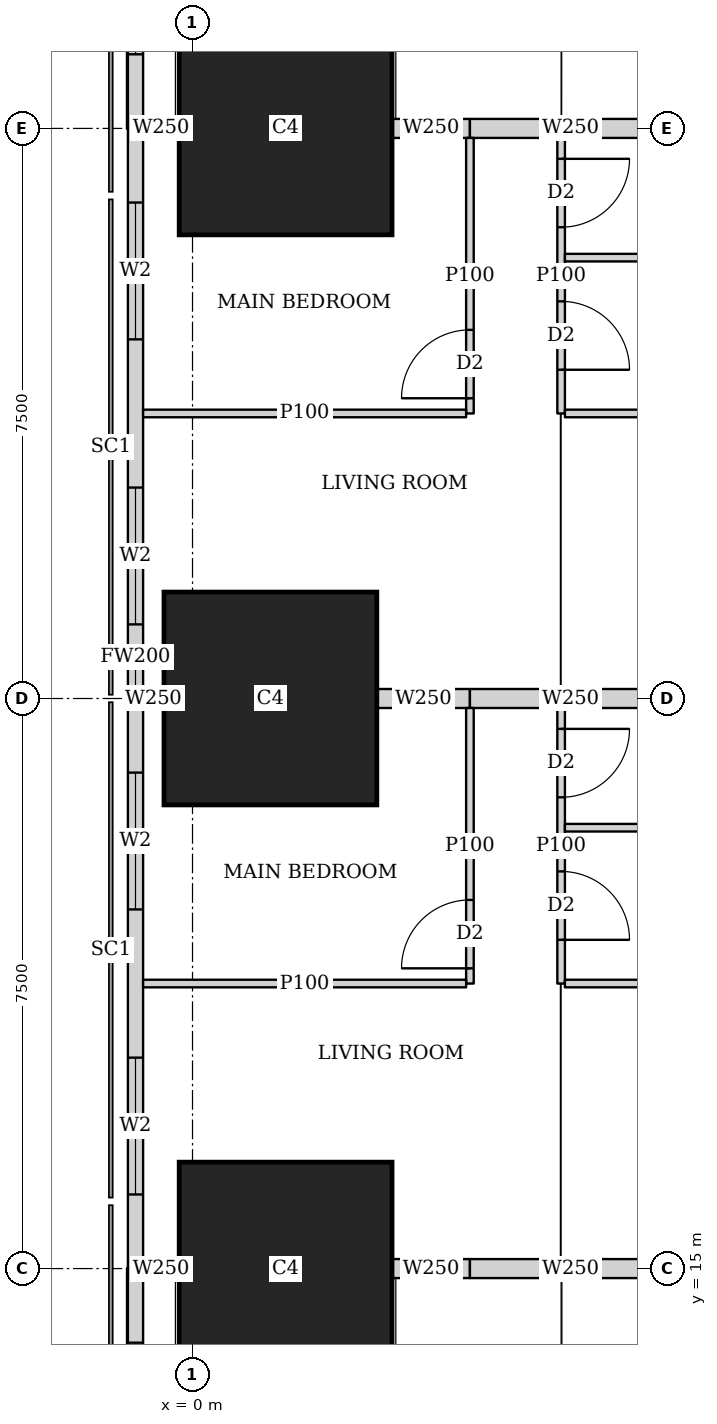
"""IFC4 building model, lengths in metres.
Left out: names, types, materials, properties, quantities, classifications, styles, units other than length and angle.
Written with IfcOpenShell. Run it as: python <this file> out.ifc"""

import sys

from ifc_helpers import new_model, si_unit, direction, frame, frame_2d, origin, origin_2d, place, context, subcontext, project, spatial, rectangle, extrude, element, fill, save


model = new_model("IFC4")
c1 = context("Model", 3, precision=1e-05, world=origin(), true_north=direction((0.0, 1.0)))
c2 = subcontext(c1, "Body", "Model", "MODEL_VIEW")
j1 = project(units=[si_unit("LENGTHUNIT", "METRE"), si_unit("PLANEANGLEUNIT", "RADIAN")], contexts=[c1])
p1 = place(None, origin())
s1 = spatial("IfcSite", under=j1, at=p1, CompositionType="ELEMENT")
p2 = place(p1, origin())
s2 = spatial("IfcBuilding", under=s1, at=p2, CompositionType="ELEMENT")
p3 = place(p2, frame((0.0, 0.0, 42.5)))
s3 = spatial("IfcBuildingStorey", under=s2, at=p3, CompositionType="ELEMENT", Elevation=42.5)
for number, where, z_axis, x_axis in (
    (1, (1.225, 15.0, 0.0), (0.0, 0.0, 1.0), (1.0, 0.0, 0.0)),
    (2, (1.025, 22.5, 0.0), (0.0, 0.0, 1.0), (1.0, 0.0, 0.0)),
    (3, (1.225, 30.0, 0.0), (0.0, 0.0, 1.0), (1.0, 0.0, 0.0)),
):
    element("IfcColumn", number, at=place(p3, frame(where, z_axis=z_axis, x_axis=x_axis)), inside=s3, PredefinedType="COLUMN", context=c2, shape_type="SweptSolid", body=[
        extrude(rectangle(XDim=2.8, YDim=2.8, at=origin_2d()), origin(), (0.0, 0.0, 1.0), 3.75),
    ])
p4 = place(p3, frame((-0.75, 42.837, 0.0), z_axis=(0.0, 0.0, 1.0), x_axis=(0.0, -1.0, 0.0)))
e4 = element("IfcWall", 4, at=p4, inside=s3, PredefinedType="SOLIDWALL", context=c2, shape_type="SweptSolid", body=[
    extrude(rectangle(XDim=40.674, YDim=0.2, at=frame_2d((20.337, 0.0))), origin(), (0.0, 0.0, 1.0), 3.5),
])
p5 = place(p4, frame((1.78, 0.0, 0.9)))
e5 = element("IfcOpeningElement", 5, at=p5, cuts=e4, PredefinedType="OPENING", context=c2, shape_type="SweptSolid", body=[
    extrude(rectangle(XDim=1.8, YDim=1.5, at=frame_2d((0.9, 0.75))), frame((0.0, 0.11, 0.0), z_axis=(0.0, -1.0, 0.0), x_axis=(1.0, 0.0, 0.0)), (0.0, 0.0, 1.0), 0.22),
])
p6 = place(p4, frame((6.312, 0.0, 0.9)))
e6 = element("IfcOpeningElement", 6, at=p6, cuts=e4, PredefinedType="OPENING", context=c2, shape_type="SweptSolid", body=[
    extrude(rectangle(XDim=1.8, YDim=1.5, at=frame_2d((0.9, 0.75))), frame((0.0, 0.11, 0.0), z_axis=(0.0, -1.0, 0.0), x_axis=(1.0, 0.0, 0.0)), (0.0, 0.0, 1.0), 0.22),
])
p7 = place(p4, frame((10.062, 0.0, 0.9)))
e7 = element("IfcOpeningElement", 7, at=p7, cuts=e4, PredefinedType="OPENING", context=c2, shape_type="SweptSolid", body=[
    extrude(rectangle(XDim=1.8, YDim=1.5, at=frame_2d((0.9, 0.75))), frame((0.0, 0.11, 0.0), z_axis=(0.0, -1.0, 0.0), x_axis=(1.0, 0.0, 0.0)), (0.0, 0.0, 1.0), 0.22),
])
p8 = place(p4, frame((13.812, 0.0, 0.9)))
e8 = element("IfcOpeningElement", 8, at=p8, cuts=e4, PredefinedType="OPENING", context=c2, shape_type="SweptSolid", body=[
    extrude(rectangle(XDim=1.8, YDim=1.5, at=frame_2d((0.9, 0.75))), frame((0.0, 0.11, 0.0), z_axis=(0.0, -1.0, 0.0), x_axis=(1.0, 0.0, 0.0)), (0.0, 0.0, 1.0), 0.22),
])
p9 = place(p4, frame((17.562, 0.0, 0.9)))
e9 = element("IfcOpeningElement", 9, at=p9, cuts=e4, PredefinedType="OPENING", context=c2, shape_type="SweptSolid", body=[
    extrude(rectangle(XDim=1.8, YDim=1.5, at=frame_2d((0.9, 0.75))), frame((0.0, 0.11, 0.0), z_axis=(0.0, -1.0, 0.0), x_axis=(1.0, 0.0, 0.0)), (0.0, 0.0, 1.0), 0.22),
])
p10 = place(p4, frame((21.312, 0.0, 0.9)))
e10 = element("IfcOpeningElement", 10, at=p10, cuts=e4, PredefinedType="OPENING", context=c2, shape_type="SweptSolid", body=[
    extrude(rectangle(XDim=1.8, YDim=1.5, at=frame_2d((0.9, 0.75))), frame((0.0, 0.11, 0.0), z_axis=(0.0, -1.0, 0.0), x_axis=(1.0, 0.0, 0.0)), (0.0, 0.0, 1.0), 0.22),
])
p11 = place(p4, frame((25.062, 0.0, 0.9)))
e11 = element("IfcOpeningElement", 11, at=p11, cuts=e4, PredefinedType="OPENING", context=c2, shape_type="SweptSolid", body=[
    extrude(rectangle(XDim=1.8, YDim=1.5, at=frame_2d((0.9, 0.75))), frame((0.0, 0.11, 0.0), z_axis=(0.0, -1.0, 0.0), x_axis=(1.0, 0.0, 0.0)), (0.0, 0.0, 1.0), 0.22),
])
p12 = place(p4, frame((28.812, 0.0, 0.9)))
e12 = element("IfcOpeningElement", 12, at=p12, cuts=e4, PredefinedType="OPENING", context=c2, shape_type="SweptSolid", body=[
    extrude(rectangle(XDim=1.8, YDim=1.5, at=frame_2d((0.9, 0.75))), frame((0.0, 0.11, 0.0), z_axis=(0.0, -1.0, 0.0), x_axis=(1.0, 0.0, 0.0)), (0.0, 0.0, 1.0), 0.22),
])
p13 = place(p4, frame((32.562, 0.0, 0.9)))
e13 = element("IfcOpeningElement", 13, at=p13, cuts=e4, PredefinedType="OPENING", context=c2, shape_type="SweptSolid", body=[
    extrude(rectangle(XDim=1.8, YDim=1.5, at=frame_2d((0.9, 0.75))), frame((0.0, 0.11, 0.0), z_axis=(0.0, -1.0, 0.0), x_axis=(1.0, 0.0, 0.0)), (0.0, 0.0, 1.0), 0.22),
])
p14 = place(p4, frame((37.094, 0.0, 0.9)))
e14 = element("IfcOpeningElement", 14, at=p14, cuts=e4, PredefinedType="OPENING", context=c2, shape_type="SweptSolid", body=[
    extrude(rectangle(XDim=1.8, YDim=1.5, at=frame_2d((0.9, 0.75))), frame((0.0, 0.11, 0.0), z_axis=(0.0, -1.0, 0.0), x_axis=(1.0, 0.0, 0.0)), (0.0, 0.0, 1.0), 0.22),
])
p15 = place(p3, frame((3.65, 18.75, 0.0), z_axis=(0.0, 0.0, 1.0), x_axis=(0.0, 1.0, 0.0)))
e15 = element("IfcWall", 15, at=p15, inside=s3, PredefinedType="PARTITIONING", context=c2, shape_type="SweptSolid", body=[
    extrude(rectangle(XDim=3.625, YDim=0.1, at=frame_2d((1.812, 0.0))), origin(), (0.0, 0.0, 1.0), 3.5),
])
p16 = place(p15, frame((0.2, 0.0, 0.0)))
e16 = element("IfcOpeningElement", 16, at=p16, cuts=e15, PredefinedType="OPENING", context=c2, shape_type="SweptSolid", body=[
    extrude(rectangle(XDim=0.9, YDim=2.1, at=frame_2d((0.45, 1.05))), frame((0.0, 0.06, 0.0), z_axis=(0.0, -1.0, 0.0), x_axis=(1.0, 0.0, 0.0)), (0.0, 0.0, 1.0), 0.12),
])
p17 = place(p3, frame((4.85, 18.75, 0.0), z_axis=(0.0, 0.0, 1.0), x_axis=(0.0, 1.0, 0.0)))
e17 = element("IfcWall", 17, at=p17, inside=s3, PredefinedType="PARTITIONING", context=c2, shape_type="SweptSolid", body=[
    extrude(rectangle(XDim=3.625, YDim=0.1, at=frame_2d((1.812, 0.0))), origin(), (0.0, 0.0, 1.0), 3.5),
])
p18 = place(p17, frame((0.575, 0.0, 0.0)))
e18 = element("IfcOpeningElement", 18, at=p18, cuts=e17, PredefinedType="OPENING", context=c2, shape_type="SweptSolid", body=[
    extrude(rectangle(XDim=0.9, YDim=2.1, at=frame_2d((0.45, 1.05))), frame((0.0, 0.06, 0.0), z_axis=(0.0, -1.0, 0.0), x_axis=(1.0, 0.0, 0.0)), (0.0, 0.0, 1.0), 0.12),
])
p19 = place(p17, frame((2.45, 0.0, 0.0)))
e19 = element("IfcOpeningElement", 19, at=p19, cuts=e17, PredefinedType="OPENING", context=c2, shape_type="SweptSolid", body=[
    extrude(rectangle(XDim=0.9, YDim=2.1, at=frame_2d((0.45, 1.05))), frame((0.0, 0.06, 0.0), z_axis=(0.0, -1.0, 0.0), x_axis=(1.0, 0.0, 0.0)), (0.0, 0.0, 1.0), 0.12),
])
p20 = place(p3, frame((-0.65, 18.75, 0.0), z_axis=(0.0, 0.0, 1.0), x_axis=(1.0, 0.0, 0.0)))
e20 = element("IfcWall", 20, at=p20, inside=s3, PredefinedType="PARTITIONING", context=c2, shape_type="SweptSolid", body=[
    extrude(rectangle(XDim=4.25, YDim=0.1, at=frame_2d((2.125, 0.0))), origin(), (0.0, 0.0, 1.0), 2.05),
])
for number, where, z_axis, x_axis in (
    (21, (4.9, 18.75, 0.0), (0.0, 0.0, 1.0), (1.0, 0.0, 0.0)),
    (22, (4.9, 20.8, 0.0), (0.0, 0.0, 1.0), (1.0, 0.0, 0.0)),
):
    element("IfcWall", number, at=place(p3, frame(where, z_axis=z_axis, x_axis=x_axis)), inside=s3, PredefinedType="PARTITIONING", context=c2, shape_type="SweptSolid", body=[
        extrude(rectangle(XDim=3.525, YDim=0.1, at=frame_2d((1.763, 0.0))), origin(), (0.0, 0.0, 1.0), 3.5),
    ])
p21 = place(p3, frame((-0.65, 15.0, 0.0), z_axis=(0.0, 0.0, 1.0), x_axis=(1.0, 0.0, 0.0)))
e23 = element("IfcWall", 23, at=p21, inside=s3, PredefinedType="SOLIDWALL", context=c2, shape_type="SweptSolid", body=[
    extrude(rectangle(XDim=0.474, YDim=0.25, at=frame_2d((0.237, 0.0))), origin(), (0.0, 0.0, 1.0), 3.5),
])
p22 = place(p3, frame((2.626, 15.0, 0.0), z_axis=(0.0, 0.0, 1.0), x_axis=(1.0, 0.0, 0.0)))
e24 = element("IfcWall", 24, at=p22, inside=s3, PredefinedType="SOLIDWALL", context=c2, shape_type="SweptSolid", body=[
    extrude(rectangle(XDim=1.024, YDim=0.25, at=frame_2d((0.512, 0.0))), origin(), (0.0, 0.0, 1.0), 3.5),
])
p23 = place(p3, frame((3.65, 15.0, 0.0), z_axis=(0.0, 0.0, 1.0), x_axis=(1.0, 0.0, 0.0)))
e25 = element("IfcWall", 25, at=p23, inside=s3, PredefinedType="SOLIDWALL", context=c2, shape_type="SweptSolid", body=[
    extrude(rectangle(XDim=2.649, YDim=0.25, at=frame_2d((1.325, 0.0))), origin(), (0.0, 0.0, 1.0), 3.5),
])
p24 = place(p3, frame((3.65, 26.25, 0.0), z_axis=(0.0, 0.0, 1.0), x_axis=(0.0, 1.0, 0.0)))
e26 = element("IfcWall", 26, at=p24, inside=s3, PredefinedType="PARTITIONING", context=c2, shape_type="SweptSolid", body=[
    extrude(rectangle(XDim=3.625, YDim=0.1, at=frame_2d((1.812, 0.0))), origin(), (0.0, 0.0, 1.0), 3.5),
])
p25 = place(p24, frame((0.2, 0.0, 0.0)))
e27 = element("IfcOpeningElement", 27, at=p25, cuts=e26, PredefinedType="OPENING", context=c2, shape_type="SweptSolid", body=[
    extrude(rectangle(XDim=0.9, YDim=2.1, at=frame_2d((0.45, 1.05))), frame((0.0, 0.06, 0.0), z_axis=(0.0, -1.0, 0.0), x_axis=(1.0, 0.0, 0.0)), (0.0, 0.0, 1.0), 0.12),
])
p26 = place(p3, frame((4.85, 26.25, 0.0), z_axis=(0.0, 0.0, 1.0), x_axis=(0.0, 1.0, 0.0)))
e28 = element("IfcWall", 28, at=p26, inside=s3, PredefinedType="PARTITIONING", context=c2, shape_type="SweptSolid", body=[
    extrude(rectangle(XDim=3.625, YDim=0.1, at=frame_2d((1.812, 0.0))), origin(), (0.0, 0.0, 1.0), 3.5),
])
p27 = place(p26, frame((0.575, 0.0, 0.0)))
e29 = element("IfcOpeningElement", 29, at=p27, cuts=e28, PredefinedType="OPENING", context=c2, shape_type="SweptSolid", body=[
    extrude(rectangle(XDim=0.9, YDim=2.1, at=frame_2d((0.45, 1.05))), frame((0.0, 0.06, 0.0), z_axis=(0.0, -1.0, 0.0), x_axis=(1.0, 0.0, 0.0)), (0.0, 0.0, 1.0), 0.12),
])
p28 = place(p26, frame((2.45, 0.0, 0.0)))
e30 = element("IfcOpeningElement", 30, at=p28, cuts=e28, PredefinedType="OPENING", context=c2, shape_type="SweptSolid", body=[
    extrude(rectangle(XDim=0.9, YDim=2.1, at=frame_2d((0.45, 1.05))), frame((0.0, 0.06, 0.0), z_axis=(0.0, -1.0, 0.0), x_axis=(1.0, 0.0, 0.0)), (0.0, 0.0, 1.0), 0.12),
])
p29 = place(p3, frame((-0.65, 26.25, 0.0), z_axis=(0.0, 0.0, 1.0), x_axis=(1.0, 0.0, 0.0)))
e31 = element("IfcWall", 31, at=p29, inside=s3, PredefinedType="PARTITIONING", context=c2, shape_type="SweptSolid", body=[
    extrude(rectangle(XDim=4.25, YDim=0.1, at=frame_2d((2.125, 0.0))), origin(), (0.0, 0.0, 1.0), 2.05),
])
for number, where, z_axis, x_axis in (
    (32, (4.9, 26.25, 0.0), (0.0, 0.0, 1.0), (1.0, 0.0, 0.0)),
    (33, (4.9, 28.3, 0.0), (0.0, 0.0, 1.0), (1.0, 0.0, 0.0)),
):
    element("IfcWall", number, at=place(p3, frame(where, z_axis=z_axis, x_axis=x_axis)), inside=s3, PredefinedType="PARTITIONING", context=c2, shape_type="SweptSolid", body=[
        extrude(rectangle(XDim=3.525, YDim=0.1, at=frame_2d((1.763, 0.0))), origin(), (0.0, 0.0, 1.0), 3.5),
    ])
p30 = place(p3, frame((-0.65, 22.5, 0.0), z_axis=(0.0, 0.0, 1.0), x_axis=(1.0, 0.0, 0.0)))
e34 = element("IfcWall", 34, at=p30, inside=s3, PredefinedType="SOLIDWALL", context=c2, shape_type="SweptSolid", body=[
    extrude(rectangle(XDim=0.274, YDim=0.25, at=frame_2d((0.137, 0.0))), origin(), (0.0, 0.0, 1.0), 3.5),
])
p31 = place(p3, frame((2.426, 22.5, 0.0), z_axis=(0.0, 0.0, 1.0), x_axis=(1.0, 0.0, 0.0)))
e35 = element("IfcWall", 35, at=p31, inside=s3, PredefinedType="SOLIDWALL", context=c2, shape_type="SweptSolid", body=[
    extrude(rectangle(XDim=1.224, YDim=0.25, at=frame_2d((0.612, 0.0))), origin(), (0.0, 0.0, 1.0), 3.5),
])
p32 = place(p3, frame((3.65, 22.5, 0.0), z_axis=(0.0, 0.0, 1.0), x_axis=(1.0, 0.0, 0.0)))
e36 = element("IfcWall", 36, at=p32, inside=s3, PredefinedType="SOLIDWALL", context=c2, shape_type="SweptSolid", body=[
    extrude(rectangle(XDim=2.649, YDim=0.25, at=frame_2d((1.325, 0.0))), origin(), (0.0, 0.0, 1.0), 3.5),
])
p33 = place(p3, frame((-0.65, 30.0, 0.0), z_axis=(0.0, 0.0, 1.0), x_axis=(1.0, 0.0, 0.0)))
e37 = element("IfcWall", 37, at=p33, inside=s3, PredefinedType="SOLIDWALL", context=c2, shape_type="SweptSolid", body=[
    extrude(rectangle(XDim=0.474, YDim=0.25, at=frame_2d((0.237, 0.0))), origin(), (0.0, 0.0, 1.0), 3.5),
])
p34 = place(p3, frame((2.626, 30.0, 0.0), z_axis=(0.0, 0.0, 1.0), x_axis=(1.0, 0.0, 0.0)))
e38 = element("IfcWall", 38, at=p34, inside=s3, PredefinedType="SOLIDWALL", context=c2, shape_type="SweptSolid", body=[
    extrude(rectangle(XDim=1.024, YDim=0.25, at=frame_2d((0.512, 0.0))), origin(), (0.0, 0.0, 1.0), 3.5),
])
p35 = place(p3, frame((3.65, 30.0, 0.0), z_axis=(0.0, 0.0, 1.0), x_axis=(1.0, 0.0, 0.0)))
e39 = element("IfcWall", 39, at=p35, inside=s3, PredefinedType="SOLIDWALL", context=c2, shape_type="SweptSolid", body=[
    extrude(rectangle(XDim=2.649, YDim=0.25, at=frame_2d((1.325, 0.0))), origin(), (0.0, 0.0, 1.0), 3.5),
])
p36 = place(p7, origin())
e40 = element("IfcWindow", 40, at=p36, inside=s3, PartitioningType="SINGLE_PANEL", PredefinedType="WINDOW", context=c2, shape_type="SweptSolid", body=[
    extrude(rectangle(XDim=1.8, YDim=1.5, at=frame_2d((0.9, 0.75))), frame((0.0, 0.03, 0.0), z_axis=(0.0, -1.0, 0.0), x_axis=(1.0, 0.0, 0.0)), (0.0, 0.0, 1.0), 0.06),
])
fill(e7, e40)
p37 = place(p8, origin())
e41 = element("IfcWindow", 41, at=p37, inside=s3, PartitioningType="SINGLE_PANEL", PredefinedType="WINDOW", context=c2, shape_type="SweptSolid", body=[
    extrude(rectangle(XDim=1.8, YDim=1.5, at=frame_2d((0.9, 0.75))), frame((0.0, 0.03, 0.0), z_axis=(0.0, -1.0, 0.0), x_axis=(1.0, 0.0, 0.0)), (0.0, 0.0, 1.0), 0.06),
])
fill(e8, e41)
p38 = place(p9, origin())
e42 = element("IfcWindow", 42, at=p38, inside=s3, PartitioningType="SINGLE_PANEL", PredefinedType="WINDOW", context=c2, shape_type="SweptSolid", body=[
    extrude(rectangle(XDim=1.8, YDim=1.5, at=frame_2d((0.9, 0.75))), frame((0.0, 0.03, 0.0), z_axis=(0.0, -1.0, 0.0), x_axis=(1.0, 0.0, 0.0)), (0.0, 0.0, 1.0), 0.06),
])
fill(e9, e42)
p39 = place(p10, origin())
e43 = element("IfcWindow", 43, at=p39, inside=s3, PartitioningType="SINGLE_PANEL", PredefinedType="WINDOW", context=c2, shape_type="SweptSolid", body=[
    extrude(rectangle(XDim=1.8, YDim=1.5, at=frame_2d((0.9, 0.75))), frame((0.0, 0.03, 0.0), z_axis=(0.0, -1.0, 0.0), x_axis=(1.0, 0.0, 0.0)), (0.0, 0.0, 1.0), 0.06),
])
fill(e10, e43)
p40 = place(p11, origin())
e44 = element("IfcWindow", 44, at=p40, inside=s3, PartitioningType="SINGLE_PANEL", PredefinedType="WINDOW", context=c2, shape_type="SweptSolid", body=[
    extrude(rectangle(XDim=1.8, YDim=1.5, at=frame_2d((0.9, 0.75))), frame((0.0, 0.03, 0.0), z_axis=(0.0, -1.0, 0.0), x_axis=(1.0, 0.0, 0.0)), (0.0, 0.0, 1.0), 0.06),
])
fill(e11, e44)
p41 = place(p12, origin())
e45 = element("IfcWindow", 45, at=p41, inside=s3, PartitioningType="SINGLE_PANEL", PredefinedType="WINDOW", context=c2, shape_type="SweptSolid", body=[
    extrude(rectangle(XDim=1.8, YDim=1.5, at=frame_2d((0.9, 0.75))), frame((0.0, 0.03, 0.0), z_axis=(0.0, -1.0, 0.0), x_axis=(1.0, 0.0, 0.0)), (0.0, 0.0, 1.0), 0.06),
])
fill(e12, e45)
p42 = place(p16, origin())
e46 = element("IfcDoor", 46, at=p42, inside=s3, OperationType="SINGLE_SWING_LEFT", PredefinedType="DOOR", context=c2, shape_type="SweptSolid", body=[
    extrude(rectangle(XDim=0.9, YDim=2.1, at=frame_2d((0.45, 1.05))), frame((0.0, 0.025, 0.0), z_axis=(0.0, -1.0, 0.0), x_axis=(1.0, 0.0, 0.0)), (0.0, 0.0, 1.0), 0.05),
])
fill(e16, e46)
p43 = place(p18, origin())
e47 = element("IfcDoor", 47, at=p43, inside=s3, OperationType="SINGLE_SWING_RIGHT", PredefinedType="DOOR", context=c2, shape_type="SweptSolid", body=[
    extrude(rectangle(XDim=0.9, YDim=2.1, at=frame_2d((0.45, 1.05))), frame((0.0, 0.025, 0.0), z_axis=(0.0, -1.0, 0.0), x_axis=(1.0, 0.0, 0.0)), (0.0, 0.0, 1.0), 0.05),
])
fill(e18, e47)
p44 = place(p19, origin())
e48 = element("IfcDoor", 48, at=p44, inside=s3, OperationType="SINGLE_SWING_LEFT", PredefinedType="DOOR", context=c2, shape_type="SweptSolid", body=[
    extrude(rectangle(XDim=0.9, YDim=2.1, at=frame_2d((0.45, 1.05))), frame((0.0, 0.025, 0.0), z_axis=(0.0, -1.0, 0.0), x_axis=(1.0, 0.0, 0.0)), (0.0, 0.0, 1.0), 0.05),
])
fill(e19, e48)
p45 = place(p25, origin())
e49 = element("IfcDoor", 49, at=p45, inside=s3, OperationType="SINGLE_SWING_LEFT", PredefinedType="DOOR", context=c2, shape_type="SweptSolid", body=[
    extrude(rectangle(XDim=0.9, YDim=2.1, at=frame_2d((0.45, 1.05))), frame((0.0, 0.025, 0.0), z_axis=(0.0, -1.0, 0.0), x_axis=(1.0, 0.0, 0.0)), (0.0, 0.0, 1.0), 0.05),
])
fill(e27, e49)
p46 = place(p27, origin())
e50 = element("IfcDoor", 50, at=p46, inside=s3, OperationType="SINGLE_SWING_RIGHT", PredefinedType="DOOR", context=c2, shape_type="SweptSolid", body=[
    extrude(rectangle(XDim=0.9, YDim=2.1, at=frame_2d((0.45, 1.05))), frame((0.0, 0.025, 0.0), z_axis=(0.0, -1.0, 0.0), x_axis=(1.0, 0.0, 0.0)), (0.0, 0.0, 1.0), 0.05),
])
fill(e29, e50)
p47 = place(p28, origin())
e51 = element("IfcDoor", 51, at=p47, inside=s3, OperationType="SINGLE_SWING_LEFT", PredefinedType="DOOR", context=c2, shape_type="SweptSolid", body=[
    extrude(rectangle(XDim=0.9, YDim=2.1, at=frame_2d((0.45, 1.05))), frame((0.0, 0.025, 0.0), z_axis=(0.0, -1.0, 0.0), x_axis=(1.0, 0.0, 0.0)), (0.0, 0.0, 1.0), 0.05),
])
fill(e30, e51)
save(model, sys.argv[1])
